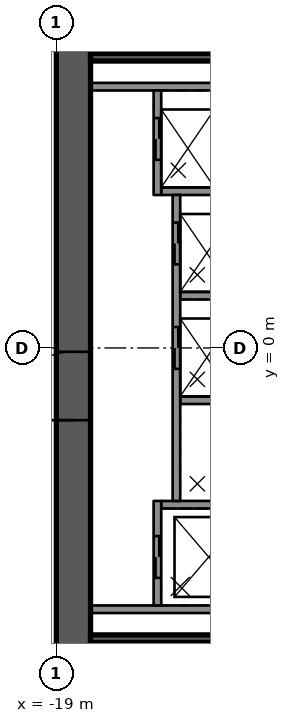
"""IFC4 building model, lengths in metres.
Left out: names, types, materials, properties, quantities, classifications, styles, units other than length and angle.
Written with IfcOpenShell. Run it as: python <this file> out.ifc"""

import sys

from ifc_helpers import new_model, si_unit, direction, frame, frame_2d, origin, place, context, subcontext, project, spatial, rectangle, extrude, element, fill, save


model = new_model("IFC4")
c1 = context("Model", 3, precision=1e-05, world=origin(), true_north=direction((0.0, 1.0)))
c2 = subcontext(c1, "Body", "Model", "MODEL_VIEW")
j1 = project(units=[si_unit("LENGTHUNIT", "METRE"), si_unit("PLANEANGLEUNIT", "RADIAN")], contexts=[c1])
p1 = place(None, origin())
s1 = spatial("IfcSite", under=j1, at=p1, CompositionType="ELEMENT")
p2 = place(p1, origin())
s2 = spatial("IfcBuilding", under=s1, at=p2, CompositionType="ELEMENT")
p3 = place(p2, frame((0.0, 0.0, 10.5)))
s3 = spatial("IfcBuildingStorey", under=s2, at=p3, CompositionType="ELEMENT", Elevation=10.5)
p4 = place(p3, frame((-18.55, -12.0, 0.0), z_axis=(0.0, 0.0, 1.0), x_axis=(0.0, 1.0, 0.0)))
e1 = element("IfcWall", 1, at=p4, inside=s3, PredefinedType="SHEAR", context=c2, shape_type="SweptSolid", body=[
    extrude(rectangle(XDim=24.0, YDim=0.9, at=frame_2d((12.0, 0.0))), origin(), (0.0, 0.0, 1.0), 5.0),
])
p5 = place(p4, frame((10.1, 0.0, 0.0)))
e2 = element("IfcOpeningElement", 2, at=p5, cuts=e1, PredefinedType="OPENING", context=c2, shape_type="SweptSolid", body=[
    extrude(rectangle(XDim=1.8, YDim=2.1, at=frame_2d((0.9, 1.05))), frame((0.0, 0.46, 0.0), z_axis=(0.0, -1.0, 0.0), x_axis=(1.0, 0.0, 0.0)), (0.0, 0.0, 1.0), 0.92),
])
for number, where, z_axis, x_axis in (
    (3, (-11.54, 6.875, 0.0), (0.0, 0.0, 1.0), (-1.0, 0.0, 0.0)),
    (4, (-11.54, -6.875, 0.0), (0.0, 0.0, 1.0), (-1.0, 0.0, 0.0)),
):
    element("IfcWall", number, at=place(p3, frame(where, z_axis=z_axis, x_axis=x_axis)), inside=s3, PredefinedType="SOLIDWALL", context=c2, shape_type="SweptSolid", body=[
        extrude(rectangle(XDim=6.56, YDim=0.2, at=frame_2d((3.28, 0.0))), origin(), (0.0, 0.0, 1.0), 4.59),
    ])
p6 = place(p3, frame((-11.54, -4.125, 0.0), z_axis=(0.0, 0.0, 1.0), x_axis=(-1.0, 0.0, 0.0)))
e5 = element("IfcWall", 5, at=p6, inside=s3, PredefinedType="SOLIDWALL", context=c2, shape_type="SweptSolid", body=[
    extrude(rectangle(XDim=4.7, YDim=0.2, at=frame_2d((2.35, 0.0))), origin(), (0.0, 0.0, 1.0), 4.59),
])
for number, where, z_axis, x_axis in (
    (6, (-11.54, -1.375, 0.0), (0.0, 0.0, 1.0), (-1.0, 0.0, 0.0)),
    (7, (-11.54, 1.375, 0.0), (0.0, 0.0, 1.0), (-1.0, 0.0, 0.0)),
):
    element("IfcWall", number, at=place(p3, frame(where, z_axis=z_axis, x_axis=x_axis)), inside=s3, PredefinedType="SOLIDWALL", context=c2, shape_type="SweptSolid", body=[
        extrude(rectangle(XDim=4.2, YDim=0.2, at=frame_2d((2.1, 0.0))), origin(), (0.0, 0.0, 1.0), 4.59),
    ])
p7 = place(p3, frame((-11.54, 4.125, 0.0), z_axis=(0.0, 0.0, 1.0), x_axis=(-1.0, 0.0, 0.0)))
e8 = element("IfcWall", 8, at=p7, inside=s3, PredefinedType="SOLIDWALL", context=c2, shape_type="SweptSolid", body=[
    extrude(rectangle(XDim=4.7, YDim=0.2, at=frame_2d((2.35, 0.0))), origin(), (0.0, 0.0, 1.0), 4.59),
])
p8 = place(p3, frame((-16.34, -6.775, 0.0), z_axis=(0.0, 0.0, 1.0), x_axis=(0.0, 1.0, 0.0)))
e9 = element("IfcWall", 9, at=p8, inside=s3, PredefinedType="SOLIDWALL", context=c2, shape_type="SweptSolid", body=[
    extrude(rectangle(XDim=2.75, YDim=0.2, at=frame_2d((1.375, 0.0))), origin(), (0.0, 0.0, 1.0), 4.59),
])
p9 = place(p8, frame((0.725, 0.0, 0.0)))
e10 = element("IfcOpeningElement", 10, at=p9, cuts=e9, PredefinedType="OPENING", context=c2, shape_type="SweptSolid", body=[
    extrude(rectangle(XDim=1.1, YDim=2.1, at=frame_2d((0.55, 1.05))), frame((0.0, 0.11, 0.0), z_axis=(0.0, -1.0, 0.0), x_axis=(1.0, 0.0, 0.0)), (0.0, 0.0, 1.0), 0.22),
])
p10 = place(p3, frame((-15.84, -4.025, 0.0), z_axis=(0.0, 0.0, 1.0), x_axis=(0.0, 1.0, 0.0)))
e11 = element("IfcWall", 11, at=p10, inside=s3, PredefinedType="SOLIDWALL", context=c2, shape_type="SweptSolid", body=[
    extrude(rectangle(XDim=8.05, YDim=0.2, at=frame_2d((4.025, 0.0))), origin(), (0.0, 0.0, 1.0), 4.59),
])
p11 = place(p10, frame((3.475, 0.0, 0.0)))
e12 = element("IfcOpeningElement", 12, at=p11, cuts=e11, PredefinedType="OPENING", context=c2, shape_type="SweptSolid", body=[
    extrude(rectangle(XDim=1.1, YDim=2.1, at=frame_2d((0.55, 1.05))), frame((0.0, 0.11, 0.0), z_axis=(0.0, -1.0, 0.0), x_axis=(1.0, 0.0, 0.0)), (0.0, 0.0, 1.0), 0.22),
])
p12 = place(p10, frame((6.225, 0.0, 0.0)))
e13 = element("IfcOpeningElement", 13, at=p12, cuts=e11, PredefinedType="OPENING", context=c2, shape_type="SweptSolid", body=[
    extrude(rectangle(XDim=1.1, YDim=2.1, at=frame_2d((0.55, 1.05))), frame((0.0, 0.11, 0.0), z_axis=(0.0, -1.0, 0.0), x_axis=(1.0, 0.0, 0.0)), (0.0, 0.0, 1.0), 0.22),
])
p13 = place(p3, frame((-16.34, 4.025, 0.0), z_axis=(0.0, 0.0, 1.0), x_axis=(0.0, 1.0, 0.0)))
e14 = element("IfcWall", 14, at=p13, inside=s3, PredefinedType="SOLIDWALL", context=c2, shape_type="SweptSolid", body=[
    extrude(rectangle(XDim=2.75, YDim=0.2, at=frame_2d((1.375, 0.0))), origin(), (0.0, 0.0, 1.0), 4.59),
])
p14 = place(p13, frame((0.925, 0.0, 0.0)))
e15 = element("IfcOpeningElement", 15, at=p14, cuts=e14, PredefinedType="OPENING", context=c2, shape_type="SweptSolid", body=[
    extrude(rectangle(XDim=1.1, YDim=2.1, at=frame_2d((0.55, 1.05))), frame((0.0, 0.11, 0.0), z_axis=(0.0, -1.0, 0.0), x_axis=(1.0, 0.0, 0.0)), (0.0, 0.0, 1.0), 0.22),
])
for number, where, z_axis, x_axis in (
    (16, (-11.54, 7.65, 0.0), (0.0, 0.0, 1.0), (-1.0, 0.0, 0.0)),
    (17, (-11.54, -7.65, 0.0), (0.0, 0.0, 1.0), (-1.0, 0.0, 0.0)),
):
    element("IfcWall", number, at=place(p3, frame(where, z_axis=z_axis, x_axis=x_axis)), inside=s3, PredefinedType="SOLIDWALL", context=c2, shape_type="SweptSolid", body=[
        extrude(rectangle(XDim=6.56, YDim=0.2, at=frame_2d((3.28, 0.0))), origin(), (0.0, 0.0, 1.0), 4.59),
    ])
p15 = place(p9, origin())
e18 = element("IfcDoor", 18, at=p15, inside=s3, OperationType="DOUBLE_DOOR_SLIDING", PredefinedType="DOOR", context=c2, shape_type="SweptSolid", body=[
    extrude(rectangle(XDim=1.1, YDim=2.1, at=frame_2d((0.55, 1.05))), frame((0.0, 0.025, 0.0), z_axis=(0.0, -1.0, 0.0), x_axis=(1.0, 0.0, 0.0)), (0.0, 0.0, 1.0), 0.05),
])
fill(e10, e18)
p16 = place(p11, origin())
e19 = element("IfcDoor", 19, at=p16, inside=s3, OperationType="DOUBLE_DOOR_SLIDING", PredefinedType="DOOR", context=c2, shape_type="SweptSolid", body=[
    extrude(rectangle(XDim=1.1, YDim=2.1, at=frame_2d((0.55, 1.05))), frame((0.0, 0.025, 0.0), z_axis=(0.0, -1.0, 0.0), x_axis=(1.0, 0.0, 0.0)), (0.0, 0.0, 1.0), 0.05),
])
fill(e12, e19)
p17 = place(p12, origin())
e20 = element("IfcDoor", 20, at=p17, inside=s3, OperationType="DOUBLE_DOOR_SLIDING", PredefinedType="DOOR", context=c2, shape_type="SweptSolid", body=[
    extrude(rectangle(XDim=1.1, YDim=2.1, at=frame_2d((0.55, 1.05))), frame((0.0, 0.025, 0.0), z_axis=(0.0, -1.0, 0.0), x_axis=(1.0, 0.0, 0.0)), (0.0, 0.0, 1.0), 0.05),
])
fill(e13, e20)
p18 = place(p14, origin())
e21 = element("IfcDoor", 21, at=p18, inside=s3, OperationType="DOUBLE_DOOR_SLIDING", PredefinedType="DOOR", context=c2, shape_type="SweptSolid", body=[
    extrude(rectangle(XDim=1.1, YDim=2.1, at=frame_2d((0.55, 1.05))), frame((0.0, 0.025, 0.0), z_axis=(0.0, -1.0, 0.0), x_axis=(1.0, 0.0, 0.0)), (0.0, 0.0, 1.0), 0.05),
])
fill(e15, e21)
p19 = place(p5, origin())
e22 = element("IfcDoor", 22, at=p19, inside=s3, OperationType="SINGLE_SWING_LEFT", PredefinedType="DOOR", context=c2, shape_type="SweptSolid", body=[
    extrude(rectangle(XDim=1.8, YDim=2.1, at=frame_2d((0.9, 1.05))), frame((0.0, 0.025, 0.0), z_axis=(0.0, -1.0, 0.0), x_axis=(1.0, 0.0, 0.0)), (0.0, 0.0, 1.0), 0.05),
])
fill(e2, e22)
save(model, sys.argv[1])
